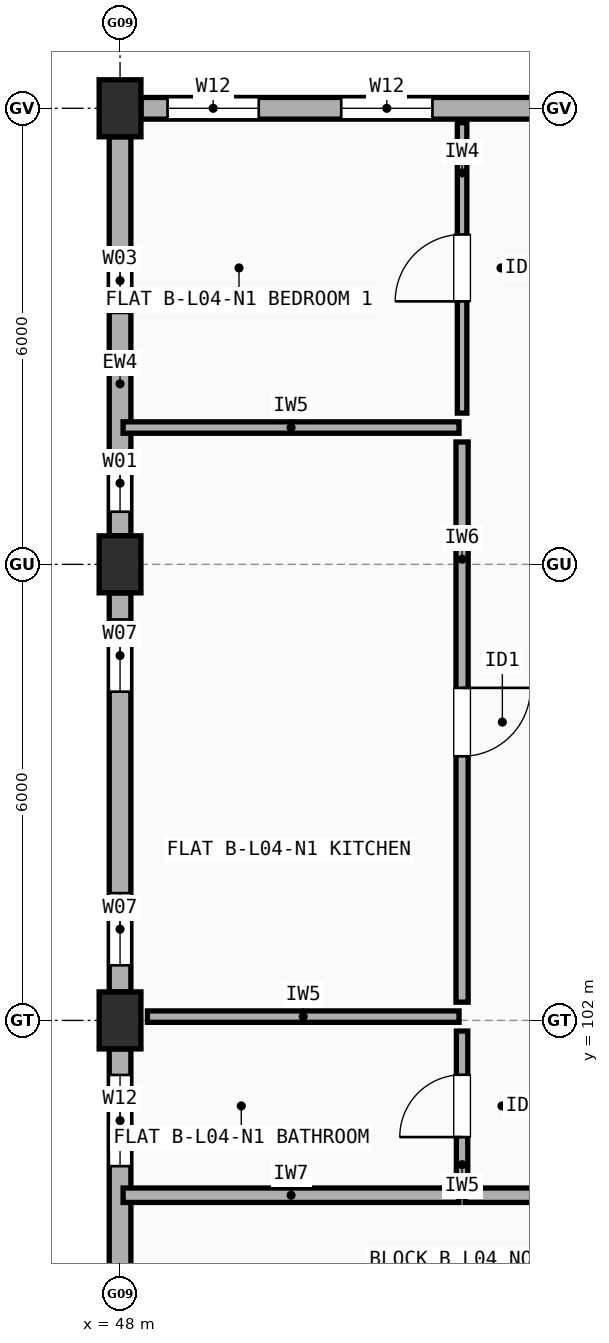
"""IFC4 building model, lengths in metres.
Left out: names, types, materials, properties, quantities, classifications, styles, units other than length and angle.
Written with IfcOpenShell. Run it as: python <this file> out.ifc"""

import sys

from ifc_helpers import new_model, si_unit, direction, frame, frame_2d, origin, origin_2d, place, context, subcontext, project, spatial, rectangle, extrude, element, fill, save


model = new_model("IFC4")
c1 = context("Model", 3, precision=1e-05, world=origin(), true_north=direction((0.0, 1.0)))
c2 = subcontext(c1, "Body", "Model", "MODEL_VIEW")
j1 = project(units=[si_unit("LENGTHUNIT", "METRE"), si_unit("PLANEANGLEUNIT", "RADIAN")], contexts=[c1])
p1 = place(None, origin())
s1 = spatial("IfcSite", under=j1, at=p1, CompositionType="ELEMENT")
p2 = place(p1, origin())
s2 = spatial("IfcBuilding", under=s1, at=p2, CompositionType="ELEMENT")
p3 = place(p2, frame((0.0, 0.0, 14.1)))
s3 = spatial("IfcBuildingStorey", under=s2, at=p3, CompositionType="ELEMENT", Elevation=14.1)
for number, where, z_axis, x_axis in (
    (1, (48.0, 102.0, 0.0), (0.0, 0.0, 1.0), (1.0, 0.0, 0.0)),
    (2, (48.0, 108.0, 0.0), (0.0, 0.0, 1.0), (1.0, 0.0, 0.0)),
    (3, (48.0, 114.0, 0.0), (0.0, 0.0, 1.0), (1.0, 0.0, 0.0)),
):
    element("IfcColumn", number, at=place(p3, frame(where, z_axis=z_axis, x_axis=x_axis)), inside=s3, PredefinedType="COLUMN", context=c2, shape_type="SweptSolid", body=[
        extrude(rectangle(XDim=0.55, YDim=0.75, at=origin_2d()), origin(), (0.0, 0.0, 1.0), 2.95),
    ])
p4 = place(p3, frame((53.675, 114.0, 0.0), z_axis=(0.0, 0.0, 1.0), x_axis=(-1.0, 0.0, 0.0)))
e4 = element("IfcWall", 4, at=p4, inside=s3, PredefinedType="STANDARD", context=c2, shape_type="SweptSolid", body=[
    extrude(rectangle(XDim=5.4, YDim=0.285, at=frame_2d((2.7, 0.0))), origin(), (0.0, 0.0, 1.0), 2.432),
])
p5 = place(p4, frame((1.565, 0.0, 0.9)))
e5 = element("IfcOpeningElement", 5, at=p5, cuts=e4, PredefinedType="OPENING", context=c2, shape_type="SweptSolid", body=[
    extrude(rectangle(XDim=1.2, YDim=1.35, at=frame_2d((0.6, 0.675))), frame((0.0, 0.152, 0.0), z_axis=(0.0, -1.0, 0.0), x_axis=(1.0, 0.0, 0.0)), (0.0, 0.0, 1.0), 0.305),
])
p6 = place(p4, frame((3.85, 0.0, 0.9)))
e6 = element("IfcOpeningElement", 6, at=p6, cuts=e4, PredefinedType="OPENING", context=c2, shape_type="SweptSolid", body=[
    extrude(rectangle(XDim=1.2, YDim=1.35, at=frame_2d((0.6, 0.675))), frame((0.0, 0.152, 0.0), z_axis=(0.0, -1.0, 0.0), x_axis=(1.0, 0.0, 0.0)), (0.0, 0.0, 1.0), 0.305),
])
p7 = place(p3, frame((48.0, 113.625, 0.0), z_axis=(0.0, 0.0, 1.0), x_axis=(0.0, -1.0, 0.0)))
e7 = element("IfcWall", 7, at=p7, inside=s3, PredefinedType="STANDARD", context=c2, shape_type="SweptSolid", body=[
    extrude(rectangle(XDim=5.25, YDim=0.285, at=frame_2d((2.625, 0.0))), origin(), (0.0, 0.0, 1.0), 2.432),
])
p8 = place(p7, frame((1.468, 0.0, 0.9)))
e8 = element("IfcOpeningElement", 8, at=p8, cuts=e7, PredefinedType="OPENING", context=c2, shape_type="SweptSolid", body=[
    extrude(rectangle(XDim=0.85, YDim=1.25, at=frame_2d((0.425, 0.625))), frame((0.0, 0.152, 0.0), z_axis=(0.0, -1.0, 0.0), x_axis=(1.0, 0.0, 0.0)), (0.0, 0.0, 1.0), 0.305),
])
p9 = place(p7, frame((4.183, 0.0, 0.9)))
e9 = element("IfcOpeningElement", 9, at=p9, cuts=e7, PredefinedType="OPENING", context=c2, shape_type="SweptSolid", body=[
    extrude(rectangle(XDim=0.75, YDim=1.15, at=frame_2d((0.375, 0.575))), frame((0.0, 0.152, 0.0), z_axis=(0.0, -1.0, 0.0), x_axis=(1.0, 0.0, 0.0)), (0.0, 0.0, 1.0), 0.305),
])
p10 = place(p3, frame((48.0, 107.625, 0.0), z_axis=(0.0, 0.0, 1.0), x_axis=(0.0, -1.0, 0.0)))
e10 = element("IfcWall", 10, at=p10, inside=s3, PredefinedType="STANDARD", context=c2, shape_type="SweptSolid", body=[
    extrude(rectangle(XDim=5.25, YDim=0.285, at=frame_2d((2.625, 0.0))), origin(), (0.0, 0.0, 1.0), 2.432),
])
p11 = place(p10, frame((0.35, 0.0, 0.9)))
e11 = element("IfcOpeningElement", 11, at=p11, cuts=e10, PredefinedType="OPENING", context=c2, shape_type="SweptSolid", body=[
    extrude(rectangle(XDim=0.95, YDim=1.35, at=frame_2d((0.475, 0.675))), frame((0.0, 0.152, 0.0), z_axis=(0.0, -1.0, 0.0), x_axis=(1.0, 0.0, 0.0)), (0.0, 0.0, 1.0), 0.305),
])
p12 = place(p10, frame((3.95, 0.0, 0.9)))
e12 = element("IfcOpeningElement", 12, at=p12, cuts=e10, PredefinedType="OPENING", context=c2, shape_type="SweptSolid", body=[
    extrude(rectangle(XDim=0.95, YDim=1.35, at=frame_2d((0.475, 0.675))), frame((0.0, 0.152, 0.0), z_axis=(0.0, -1.0, 0.0), x_axis=(1.0, 0.0, 0.0)), (0.0, 0.0, 1.0), 0.305),
])
p13 = place(p3, frame((48.0, 101.625, 0.0), z_axis=(0.0, 0.0, 1.0), x_axis=(0.0, -1.0, 0.0)))
e13 = element("IfcWall", 13, at=p13, inside=s3, PredefinedType="STANDARD", context=c2, shape_type="SweptSolid", body=[
    extrude(rectangle(XDim=5.25, YDim=0.285, at=frame_2d((2.625, 0.0))), origin(), (0.0, 0.0, 1.0), 2.432),
])
p14 = place(p13, frame((0.343, 0.0, 0.9)))
e14 = element("IfcOpeningElement", 14, at=p14, cuts=e13, PredefinedType="OPENING", context=c2, shape_type="SweptSolid", body=[
    extrude(rectangle(XDim=1.2, YDim=1.35, at=frame_2d((0.6, 0.675))), frame((0.0, 0.152, 0.0), z_axis=(0.0, -1.0, 0.0), x_axis=(1.0, 0.0, 0.0)), (0.0, 0.0, 1.0), 0.305),
])
p15 = place(p13, frame((3.208, 0.0, 0.9)))
e15 = element("IfcOpeningElement", 15, at=p15, cuts=e13, PredefinedType="OPENING", context=c2, shape_type="SweptSolid", body=[
    extrude(rectangle(XDim=0.8, YDim=1.2, at=frame_2d((0.4, 0.6))), frame((0.0, 0.152, 0.0), z_axis=(0.0, -1.0, 0.0), x_axis=(1.0, 0.0, 0.0)), (0.0, 0.0, 1.0), 0.305),
])
p16 = place(p3, frame((48.04, 99.7, 0.0), z_axis=(0.0, 0.0, 1.0), x_axis=(1.0, 0.0, 0.0)))
e16 = element("IfcWall", 16, at=p16, inside=s3, PredefinedType="SOLIDWALL", context=c2, shape_type="SweptSolid", body=[
    extrude(rectangle(XDim=4.42, YDim=0.19, at=frame_2d((2.21, 0.0))), origin(), (0.0, 0.0, 1.0), 2.432),
])
p17 = place(p3, frame((52.54, 99.7, 0.0), z_axis=(0.0, 0.0, 1.0), x_axis=(1.0, 0.0, 0.0)))
e17 = element("IfcWall", 17, at=p17, inside=s3, PredefinedType="SOLIDWALL", context=c2, shape_type="SweptSolid", body=[
    extrude(rectangle(XDim=10.42, YDim=0.19, at=frame_2d((5.21, 0.0))), origin(), (0.0, 0.0, 1.0), 2.508),
])
p18 = place(p17, frame((4.71, 0.0, 0.0)))
e18 = element("IfcOpeningElement", 18, at=p18, cuts=e17, PredefinedType="OPENING", context=c2, shape_type="SweptSolid", body=[
    extrude(rectangle(XDim=1.0, YDim=2.15, at=frame_2d((0.5, 1.075))), frame((0.0, 0.105, 0.0), z_axis=(0.0, -1.0, 0.0), x_axis=(1.0, 0.0, 0.0)), (0.0, 0.0, 1.0), 0.21),
])
p19 = place(p3, frame((52.5, 109.99, 0.0), z_axis=(0.0, 0.0, 1.0), x_axis=(0.0, 1.0, 0.0)))
e19 = element("IfcWall", 19, at=p19, inside=s3, PredefinedType="PARTITIONING", context=c2, shape_type="SweptSolid", body=[
    extrude(rectangle(XDim=3.82, YDim=0.125, at=frame_2d((1.91, 0.0))), origin(), (0.0, 0.0, 1.0), 2.95),
])
p20 = place(p19, frame((1.47, 0.0, 0.0)))
e20 = element("IfcOpeningElement", 20, at=p20, cuts=e19, PredefinedType="OPENING", context=c2, shape_type="SweptSolid", body=[
    extrude(rectangle(XDim=0.88, YDim=2.1, at=frame_2d((0.44, 1.05))), frame((0.0, 0.073, 0.0), z_axis=(0.0, -1.0, 0.0), x_axis=(1.0, 0.0, 0.0)), (0.0, 0.0, 1.0), 0.145),
])
p21 = place(p3, frame((52.5, 102.24, 0.0), z_axis=(0.0, 0.0, 1.0), x_axis=(0.0, 1.0, 0.0)))
e21 = element("IfcWall", 21, at=p21, inside=s3, PredefinedType="PLUMBINGWALL", context=c2, shape_type="SweptSolid", body=[
    extrude(rectangle(XDim=7.37, YDim=0.16, at=frame_2d((3.685, 0.0))), origin(), (0.0, 0.0, 1.0), 2.432),
])
p22 = place(p21, frame((3.235, 0.0, 0.0)))
e22 = element("IfcOpeningElement", 22, at=p22, cuts=e21, PredefinedType="OPENING", context=c2, shape_type="SweptSolid", body=[
    extrude(rectangle(XDim=0.9, YDim=2.1, at=frame_2d((0.45, 1.05))), frame((0.0, 0.09, 0.0), z_axis=(0.0, -1.0, 0.0), x_axis=(1.0, 0.0, 0.0)), (0.0, 0.0, 1.0), 0.18),
])
p23 = place(p3, frame((52.5, 99.89, 0.0), z_axis=(0.0, 0.0, 1.0), x_axis=(0.0, 1.0, 0.0)))
e23 = element("IfcWall", 23, at=p23, inside=s3, PredefinedType="PARTITIONING", context=c2, shape_type="SweptSolid", body=[
    extrude(rectangle(XDim=1.97, YDim=0.15, at=frame_2d((0.985, 0.0))), origin(), (0.0, 0.0, 1.0), 2.95),
])
p24 = place(p23, frame((0.575, 0.0, 0.0)))
e24 = element("IfcOpeningElement", 24, at=p24, cuts=e23, PredefinedType="OPENING", context=c2, shape_type="SweptSolid", body=[
    extrude(rectangle(XDim=0.82, YDim=2.08, at=frame_2d((0.41, 1.04))), frame((0.0, 0.085, 0.0), z_axis=(0.0, -1.0, 0.0), x_axis=(1.0, 0.0, 0.0)), (0.0, 0.0, 1.0), 0.17),
])
p25 = place(p3, frame((48.04, 109.8, 0.0), z_axis=(0.0, 0.0, 1.0), x_axis=(1.0, 0.0, 0.0)))
e25 = element("IfcWall", 25, at=p25, inside=s3, PredefinedType="PARTITIONING", context=c2, shape_type="SweptSolid", body=[
    extrude(rectangle(XDim=4.42, YDim=0.15, at=frame_2d((2.21, 0.0))), origin(), (0.0, 0.0, 1.0), 2.432),
])
p26 = place(p3, frame((48.36, 102.05, 0.0), z_axis=(0.0, 0.0, 1.0), x_axis=(1.0, 0.0, 0.0)))
e26 = element("IfcWall", 26, at=p26, inside=s3, PredefinedType="PARTITIONING", context=c2, shape_type="SweptSolid", body=[
    extrude(rectangle(XDim=4.1, YDim=0.15, at=frame_2d((2.05, 0.0))), origin(), (0.0, 0.0, 1.0), 2.432),
])
p27 = place(p5, origin())
e27 = element("IfcWindow", 27, at=p27, inside=s3, PartitioningType="SINGLE_PANEL", PredefinedType="WINDOW", context=c2, shape_type="SweptSolid", body=[
    extrude(rectangle(XDim=1.2, YDim=1.35, at=frame_2d((0.6, 0.675))), frame((0.0, 0.03, 0.0), z_axis=(0.0, -1.0, 0.0), x_axis=(1.0, 0.0, 0.0)), (0.0, 0.0, 1.0), 0.06),
])
fill(e5, e27)
p28 = place(p6, origin())
e28 = element("IfcWindow", 28, at=p28, inside=s3, PartitioningType="SINGLE_PANEL", PredefinedType="WINDOW", context=c2, shape_type="SweptSolid", body=[
    extrude(rectangle(XDim=1.2, YDim=1.35, at=frame_2d((0.6, 0.675))), frame((0.0, 0.03, 0.0), z_axis=(0.0, -1.0, 0.0), x_axis=(1.0, 0.0, 0.0)), (0.0, 0.0, 1.0), 0.06),
])
fill(e6, e28)
p29 = place(p8, origin())
e29 = element("IfcWindow", 29, at=p29, inside=s3, PartitioningType="SINGLE_PANEL", PredefinedType="WINDOW", context=c2, shape_type="SweptSolid", body=[
    extrude(rectangle(XDim=0.85, YDim=1.25, at=frame_2d((0.425, 0.625))), frame((0.0, 0.03, 0.0), z_axis=(0.0, -1.0, 0.0), x_axis=(1.0, 0.0, 0.0)), (0.0, 0.0, 1.0), 0.06),
])
fill(e8, e29)
p30 = place(p9, origin())
e30 = element("IfcWindow", 30, at=p30, inside=s3, PartitioningType="SINGLE_PANEL", PredefinedType="WINDOW", context=c2, shape_type="SweptSolid", body=[
    extrude(rectangle(XDim=0.75, YDim=1.15, at=frame_2d((0.375, 0.575))), frame((0.0, 0.03, 0.0), z_axis=(0.0, -1.0, 0.0), x_axis=(1.0, 0.0, 0.0)), (0.0, 0.0, 1.0), 0.06),
])
fill(e9, e30)
p31 = place(p11, origin())
e31 = element("IfcWindow", 31, at=p31, inside=s3, PartitioningType="SINGLE_PANEL", PredefinedType="WINDOW", context=c2, shape_type="SweptSolid", body=[
    extrude(rectangle(XDim=0.95, YDim=1.35, at=frame_2d((0.475, 0.675))), frame((0.0, 0.03, 0.0), z_axis=(0.0, -1.0, 0.0), x_axis=(1.0, 0.0, 0.0)), (0.0, 0.0, 1.0), 0.06),
])
fill(e11, e31)
p32 = place(p12, origin())
e32 = element("IfcWindow", 32, at=p32, inside=s3, PartitioningType="SINGLE_PANEL", PredefinedType="WINDOW", context=c2, shape_type="SweptSolid", body=[
    extrude(rectangle(XDim=0.95, YDim=1.35, at=frame_2d((0.475, 0.675))), frame((0.0, 0.03, 0.0), z_axis=(0.0, -1.0, 0.0), x_axis=(1.0, 0.0, 0.0)), (0.0, 0.0, 1.0), 0.06),
])
fill(e12, e32)
p33 = place(p14, origin())
e33 = element("IfcWindow", 33, at=p33, inside=s3, PartitioningType="SINGLE_PANEL", PredefinedType="WINDOW", context=c2, shape_type="SweptSolid", body=[
    extrude(rectangle(XDim=1.2, YDim=1.35, at=frame_2d((0.6, 0.675))), frame((0.0, 0.03, 0.0), z_axis=(0.0, -1.0, 0.0), x_axis=(1.0, 0.0, 0.0)), (0.0, 0.0, 1.0), 0.06),
])
fill(e14, e33)
p34 = place(p20, origin())
e34 = element("IfcDoor", 34, at=p34, inside=s3, OperationType="SINGLE_SWING_LEFT", PredefinedType="DOOR", context=c2, shape_type="SweptSolid", body=[
    extrude(rectangle(XDim=0.88, YDim=2.1, at=frame_2d((0.44, 1.05))), frame((0.0, 0.025, 0.0), z_axis=(0.0, -1.0, 0.0), x_axis=(1.0, 0.0, 0.0)), (0.0, 0.0, 1.0), 0.05),
])
fill(e20, e34)
p35 = place(p22, origin())
e35 = element("IfcDoor", 35, at=p35, inside=s3, OperationType="SINGLE_SWING_RIGHT", PredefinedType="DOOR", context=c2, shape_type="SweptSolid", body=[
    extrude(rectangle(XDim=0.9, YDim=2.1, at=frame_2d((0.45, 1.05))), frame((0.0, 0.025, 0.0), z_axis=(0.0, -1.0, 0.0), x_axis=(1.0, 0.0, 0.0)), (0.0, 0.0, 1.0), 0.05),
])
fill(e22, e35)
p36 = place(p24, origin())
e36 = element("IfcDoor", 36, at=p36, inside=s3, OperationType="SINGLE_SWING_LEFT", PredefinedType="DOOR", context=c2, shape_type="SweptSolid", body=[
    extrude(rectangle(XDim=0.82, YDim=2.08, at=frame_2d((0.41, 1.04))), frame((0.0, 0.025, 0.0), z_axis=(0.0, -1.0, 0.0), x_axis=(1.0, 0.0, 0.0)), (0.0, 0.0, 1.0), 0.05),
])
fill(e24, e36)
save(model, sys.argv[1])
